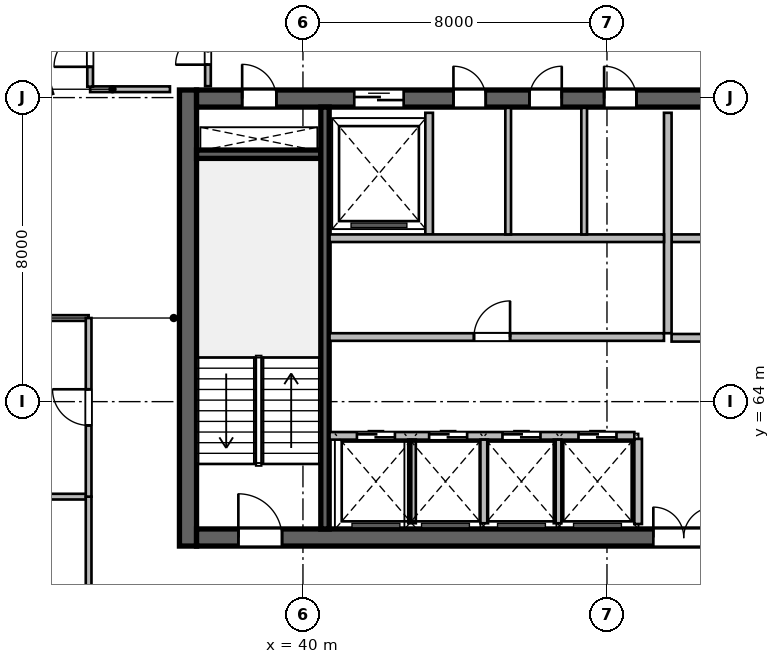
"""IFC4 building model, lengths in metres.
Left out: names, types, materials, properties, quantities, classifications, styles, units other than length and angle.
Written with IfcOpenShell. Run it as: python <this file> out.ifc"""

import sys

from ifc_helpers import new_model, si_unit, direction, frame, frame_2d, origin, place, context, subcontext, project, spatial, rectangle, extrude, source, transform, mapped, element, fill, save


model = new_model("IFC4")
c1 = context("Model", 3, precision=1e-05, world=origin(), true_north=direction((0.0, 1.0)))
c2 = subcontext(c1, "Body", "Model", "MODEL_VIEW")
j1 = project(units=[si_unit("LENGTHUNIT", "METRE"), si_unit("PLANEANGLEUNIT", "RADIAN")], contexts=[c1])
p1 = place(None, origin())
s1 = spatial("IfcSite", under=j1, at=p1, CompositionType="ELEMENT")
p2 = place(p1, origin())
s2 = spatial("IfcBuilding", under=s1, at=p2, CompositionType="ELEMENT")
p3 = place(p2, frame((0.0, 0.0, 211.8)))
s3 = spatial("IfcBuildingStorey", under=s2, at=p3, CompositionType="ELEMENT", Elevation=211.8)
m1 = source(origin(), c2, "Body", "SweptSolid", [
    extrude(rectangle(XDim=12.0, YDim=0.45, at=frame_2d((6.0, 0.0))), origin(), (0.0, 0.0, 1.0), 3.9),
])
p4 = place(p3, frame((36.975, 60.2, 0.0), z_axis=(0.0, 0.0, 1.0), x_axis=(0.0, 1.0, 0.0)))
e1 = element("IfcWall", 1, at=p4, inside=s3, PredefinedType="SHEAR", context=c2, shape_type="MappedRepresentation", body=[
    mapped(m1, transform((0.0, 0.0, 0.0), scale=1.0)),
])
m2 = source(origin(), c2, "Body", "SweptSolid", [
    extrude(rectangle(XDim=21.6, YDim=0.45, at=frame_2d((10.8, 0.0))), origin(), (0.0, 0.0, 1.0), 3.9),
])
p5 = place(p3, frame((37.2, 60.425, 0.0), z_axis=(0.0, 0.0, 1.0), x_axis=(1.0, 0.0, 0.0)))
e2 = element("IfcWall", 2, at=p5, inside=s3, PredefinedType="SHEAR", context=c2, shape_type="MappedRepresentation", body=[
    mapped(m2, transform((0.0, 0.0, 0.0), scale=1.0)),
])
p6 = place(p5, frame((1.1, 0.0, 0.0)))
e3 = element("IfcOpeningElement", 3, at=p6, cuts=e2, PredefinedType="OPENING", context=c2, shape_type="SweptSolid", body=[
    extrude(rectangle(XDim=1.15, YDim=2.15, at=frame_2d((0.575, 1.075))), frame((0.0, 0.235, 0.0), z_axis=(0.0, -1.0, 0.0), x_axis=(1.0, 0.0, 0.0)), (0.0, 0.0, 1.0), 0.47),
])
p7 = place(p5, frame((19.5, 0.0, 0.0)))
e4 = element("IfcOpeningElement", 4, at=p7, cuts=e2, PredefinedType="OPENING", context=c2, shape_type="SweptSolid", body=[
    extrude(rectangle(XDim=0.9, YDim=2.1, at=frame_2d((0.45, 1.05))), frame((0.0, 0.235, 0.0), z_axis=(0.0, -1.0, 0.0), x_axis=(1.0, 0.0, 0.0)), (0.0, 0.0, 1.0), 0.47),
])
p8 = place(p5, frame((12.02, 0.0, 0.0)))
e5 = element("IfcOpeningElement", 5, at=p8, cuts=e2, PredefinedType="OPENING", context=c2, shape_type="SweptSolid", body=[
    extrude(rectangle(XDim=1.6, YDim=2.15, at=frame_2d((0.8, 1.075))), frame((0.0, 0.235, 0.0), z_axis=(0.0, -1.0, 0.0), x_axis=(1.0, 0.0, 0.0)), (0.0, 0.0, 1.0), 0.47),
])
p9 = place(p3, frame((37.2, 71.975, 0.0), z_axis=(0.0, 0.0, 1.0), x_axis=(1.0, 0.0, 0.0)))
e6 = element("IfcWall", 6, at=p9, inside=s3, PredefinedType="SHEAR", context=c2, shape_type="MappedRepresentation", body=[
    mapped(m2, transform((0.0, 0.0, 0.0), scale=1.0)),
])
p10 = place(p9, frame((1.2, 0.0, 0.0)))
e7 = element("IfcOpeningElement", 7, at=p10, cuts=e6, PredefinedType="OPENING", context=c2, shape_type="SweptSolid", body=[
    extrude(rectangle(XDim=0.9, YDim=2.1, at=frame_2d((0.45, 1.05))), frame((0.0, 0.235, 0.0), z_axis=(0.0, -1.0, 0.0), x_axis=(1.0, 0.0, 0.0)), (0.0, 0.0, 1.0), 0.47),
])
p11 = place(p9, frame((14.7, 0.0, 0.0)))
e8 = element("IfcOpeningElement", 8, at=p11, cuts=e6, PredefinedType="OPENING", context=c2, shape_type="SweptSolid", body=[
    extrude(rectangle(XDim=1.2, YDim=2.15, at=frame_2d((0.6, 1.075))), frame((0.0, 0.235, 0.0), z_axis=(0.0, -1.0, 0.0), x_axis=(1.0, 0.0, 0.0)), (0.0, 0.0, 1.0), 0.47),
])
p12 = place(p9, frame((4.15, 0.0, 0.0)))
e9 = element("IfcOpeningElement", 9, at=p12, cuts=e6, PredefinedType="OPENING", context=c2, shape_type="SweptSolid", body=[
    extrude(rectangle(XDim=1.3, YDim=2.15, at=frame_2d((0.65, 1.075))), frame((0.0, 0.235, 0.0), z_axis=(0.0, -1.0, 0.0), x_axis=(1.0, 0.0, 0.0)), (0.0, 0.0, 1.0), 0.47),
])
p13 = place(p9, frame((6.76, 0.0, 0.0)))
e10 = element("IfcOpeningElement", 10, at=p13, cuts=e6, PredefinedType="OPENING", context=c2, shape_type="SweptSolid", body=[
    extrude(rectangle(XDim=0.85, YDim=2.1, at=frame_2d((0.425, 1.05))), frame((0.0, 0.235, 0.0), z_axis=(0.0, -1.0, 0.0), x_axis=(1.0, 0.0, 0.0)), (0.0, 0.0, 1.0), 0.47),
])
p14 = place(p9, frame((8.76, 0.0, 0.0)))
e11 = element("IfcOpeningElement", 11, at=p14, cuts=e6, PredefinedType="OPENING", context=c2, shape_type="SweptSolid", body=[
    extrude(rectangle(XDim=0.85, YDim=2.1, at=frame_2d((0.425, 1.05))), frame((0.0, 0.235, 0.0), z_axis=(0.0, -1.0, 0.0), x_axis=(1.0, 0.0, 0.0)), (0.0, 0.0, 1.0), 0.47),
])
p15 = place(p9, frame((10.725, 0.0, 0.0)))
e12 = element("IfcOpeningElement", 12, at=p15, cuts=e6, PredefinedType="OPENING", context=c2, shape_type="SweptSolid", body=[
    extrude(rectangle(XDim=0.85, YDim=2.1, at=frame_2d((0.425, 1.05))), frame((0.0, 0.235, 0.0), z_axis=(0.0, -1.0, 0.0), x_axis=(1.0, 0.0, 0.0)), (0.0, 0.0, 1.0), 0.47),
])
m3 = source(origin(), c2, "Body", "SweptSolid", [
    extrude(rectangle(XDim=3.27, YDim=0.22, at=frame_2d((1.635, 0.0))), origin(), (0.0, 0.0, 1.0), 3.9),
])
p16 = place(p3, frame((37.2, 70.51, 0.0), z_axis=(0.0, 0.0, 1.0), x_axis=(1.0, 0.0, 0.0)))
e13 = element("IfcWall", 13, at=p16, inside=s3, PredefinedType="SHEAR", context=c2, shape_type="MappedRepresentation", body=[
    mapped(m3, transform((0.0, 0.0, 0.0), scale=1.0)),
])
m4 = source(origin(), c2, "Body", "SweptSolid", [
    extrude(rectangle(XDim=11.1, YDim=0.22, at=frame_2d((5.55, 0.0))), origin(), (0.0, 0.0, 1.0), 3.9),
])
p17 = place(p3, frame((40.58, 60.65, 0.0), z_axis=(0.0, 0.0, 1.0), x_axis=(0.0, 1.0, 0.0)))
e14 = element("IfcWall", 14, at=p17, inside=s3, PredefinedType="SHEAR", context=c2, shape_type="MappedRepresentation", body=[
    mapped(m4, transform((0.0, 0.0, 0.0), scale=1.0)),
])
m5 = source(origin(), c2, "Body", "SweptSolid", [
    extrude(rectangle(XDim=2.24, YDim=0.2, at=frame_2d((1.12, 0.0))), origin(), (0.0, 0.0, 1.0), 3.64),
])
p18 = place(p3, frame((48.82, 60.78, 0.0), z_axis=(0.0, 0.0, 1.0), x_axis=(0.0, 1.0, 0.0)))
e15 = element("IfcWall", 15, at=p18, inside=s3, PredefinedType="SOLIDWALL", context=c2, shape_type="MappedRepresentation", body=[
    mapped(m5, transform((0.0, 0.0, 0.0), scale=1.0)),
])
m6 = source(origin(), c2, "Body", "SweptSolid", [
    extrude(rectangle(XDim=5.62, YDim=0.2, at=frame_2d((2.81, 0.0))), origin(), (0.0, 0.0, 1.0), 3.64),
])
p19 = place(p3, frame((49.7, 68.3, 0.0), z_axis=(0.0, 0.0, 1.0), x_axis=(1.0, 0.0, 0.0)))
e16 = element("IfcWall", 16, at=p19, inside=s3, PredefinedType="SOLIDWALL", context=c2, shape_type="MappedRepresentation", body=[
    mapped(m6, transform((0.0, 0.0, 0.0), scale=1.0)),
])
p20 = place(p19, frame((1.6, 0.0, 0.0)))
e17 = element("IfcOpeningElement", 17, at=p20, cuts=e16, PredefinedType="OPENING", context=c2, shape_type="SweptSolid", body=[
    extrude(rectangle(XDim=1.1, YDim=2.15, at=frame_2d((0.55, 1.075))), frame((0.0, 0.11, 0.0), z_axis=(0.0, -1.0, 0.0), x_axis=(1.0, 0.0, 0.0)), (0.0, 0.0, 1.0), 0.22),
])
p21 = place(p19, frame((3.7, 0.0, 0.0)))
e18 = element("IfcOpeningElement", 18, at=p21, cuts=e16, PredefinedType="OPENING", context=c2, shape_type="SweptSolid", body=[
    extrude(rectangle(XDim=1.1, YDim=2.15, at=frame_2d((0.55, 1.075))), frame((0.0, 0.11, 0.0), z_axis=(0.0, -1.0, 0.0), x_axis=(1.0, 0.0, 0.0)), (0.0, 0.0, 1.0), 0.22),
])
m7 = source(origin(), c2, "Body", "SweptSolid", [
    extrude(rectangle(XDim=5.8, YDim=0.2, at=frame_2d((2.9, 0.0))), origin(), (0.0, 0.0, 1.0), 3.64),
])
p22 = place(p3, frame((49.6, 65.8, 0.0), z_axis=(0.0, 0.0, 1.0), x_axis=(0.0, 1.0, 0.0)))
e19 = element("IfcWall", 19, at=p22, inside=s3, PredefinedType="SOLIDWALL", context=c2, shape_type="MappedRepresentation", body=[
    mapped(m7, transform((0.0, 0.0, 0.0), scale=1.0)),
])
p23 = place(p3, frame((49.7, 65.68, 0.0), z_axis=(0.0, 0.0, 1.0), x_axis=(1.0, 0.0, 0.0)))
e20 = element("IfcWall", 20, at=p23, inside=s3, PredefinedType="SOLIDWALL", context=c2, shape_type="MappedRepresentation", body=[
    mapped(m6, transform((0.0, 0.0, 0.0), scale=1.0)),
])
m8 = source(origin(), c2, "Body", "SweptSolid", [
    extrude(rectangle(XDim=3.2, YDim=0.2, at=frame_2d((1.6, 0.0))), origin(), (0.0, 0.0, 1.0), 3.64),
])
p24 = place(p3, frame((43.32, 68.4, 0.0), z_axis=(0.0, 0.0, 1.0), x_axis=(0.0, 1.0, 0.0)))
e21 = element("IfcWall", 21, at=p24, inside=s3, PredefinedType="SOLIDWALL", context=c2, shape_type="MappedRepresentation", body=[
    mapped(m8, transform((0.0, 0.0, 0.0), scale=1.0)),
])
m9 = source(origin(), c2, "Body", "SweptSolid", [
    extrude(rectangle(XDim=8.8, YDim=0.2, at=frame_2d((4.4, 0.0))), origin(), (0.0, 0.0, 1.0), 3.64),
])
p25 = place(p3, frame((40.7, 68.3, 0.0), z_axis=(0.0, 0.0, 1.0), x_axis=(1.0, 0.0, 0.0)))
e22 = element("IfcWall", 22, at=p25, inside=s3, PredefinedType="SOLIDWALL", context=c2, shape_type="MappedRepresentation", body=[
    mapped(m9, transform((0.0, 0.0, 0.0), scale=1.0)),
])
m10 = source(origin(), c2, "Body", "SweptSolid", [
    extrude(rectangle(XDim=3.33, YDim=0.15, at=frame_2d((1.665, 0.0))), origin(), (0.0, 0.0, 1.0), 3.64),
])
for number, where, z_axis, x_axis in (
    (23, (45.4, 68.4, 0.0), (0.0, 0.0, 1.0), (0.0, 1.0, 0.0)),
    (24, (47.4, 68.4, 0.0), (0.0, 0.0, 1.0), (0.0, 1.0, 0.0)),
):
    element("IfcWall", number, at=place(p3, frame(where, z_axis=z_axis, x_axis=x_axis)), inside=s3, PredefinedType="PARTITIONING", context=c2, shape_type="MappedRepresentation", body=[
        mapped(m10, transform((0.0, 0.0, 0.0), scale=1.0)),
    ])
m11 = source(origin(), c2, "Body", "SweptSolid", [
    extrude(rectangle(XDim=8.02, YDim=0.2, at=frame_2d((4.01, 0.0))), origin(), (0.0, 0.0, 1.0), 3.64),
])
p26 = place(p3, frame((40.7, 63.1, 0.0), z_axis=(0.0, 0.0, 1.0), x_axis=(1.0, 0.0, 0.0)))
e25 = element("IfcWall", 25, at=p26, inside=s3, PredefinedType="SOLIDWALL", context=c2, shape_type="MappedRepresentation", body=[
    mapped(m11, transform((0.0, 0.0, 0.0), scale=1.0)),
])
p27 = place(p26, frame((0.72, 0.0, 0.0)))
e26 = element("IfcOpeningElement", 26, at=p27, cuts=e25, PredefinedType="OPENING", context=c2, shape_type="SweptSolid", body=[
    extrude(rectangle(XDim=1.0, YDim=2.15, at=frame_2d((0.5, 1.075))), frame((0.0, 0.11, 0.0), z_axis=(0.0, -1.0, 0.0), x_axis=(1.0, 0.0, 0.0)), (0.0, 0.0, 1.0), 0.22),
])
p28 = place(p26, frame((2.62, 0.0, 0.0)))
e27 = element("IfcOpeningElement", 27, at=p28, cuts=e25, PredefinedType="OPENING", context=c2, shape_type="SweptSolid", body=[
    extrude(rectangle(XDim=1.0, YDim=2.15, at=frame_2d((0.5, 1.075))), frame((0.0, 0.11, 0.0), z_axis=(0.0, -1.0, 0.0), x_axis=(1.0, 0.0, 0.0)), (0.0, 0.0, 1.0), 0.22),
])
p29 = place(p26, frame((4.55, 0.0, 0.0)))
e28 = element("IfcOpeningElement", 28, at=p29, cuts=e25, PredefinedType="OPENING", context=c2, shape_type="SweptSolid", body=[
    extrude(rectangle(XDim=1.0, YDim=2.15, at=frame_2d((0.5, 1.075))), frame((0.0, 0.11, 0.0), z_axis=(0.0, -1.0, 0.0), x_axis=(1.0, 0.0, 0.0)), (0.0, 0.0, 1.0), 0.22),
])
p30 = place(p26, frame((6.55, 0.0, 0.0)))
e29 = element("IfcOpeningElement", 29, at=p30, cuts=e25, PredefinedType="OPENING", context=c2, shape_type="SweptSolid", body=[
    extrude(rectangle(XDim=1.0, YDim=2.15, at=frame_2d((0.5, 1.075))), frame((0.0, 0.11, 0.0), z_axis=(0.0, -1.0, 0.0), x_axis=(1.0, 0.0, 0.0)), (0.0, 0.0, 1.0), 0.22),
])
m12 = source(origin(), c2, "Body", "SweptSolid", [
    extrude(rectangle(XDim=2.2, YDim=0.2, at=frame_2d((1.1, 0.0))), origin(), (0.0, 0.0, 1.0), 3.64),
])
for number, where, z_axis, x_axis in (
    (30, (42.87, 60.8, 0.0), (0.0, 0.0, 1.0), (0.0, 1.0, 0.0)),
    (31, (44.77, 60.8, 0.0), (0.0, 0.0, 1.0), (0.0, 1.0, 0.0)),
    (32, (46.7, 60.8, 0.0), (0.0, 0.0, 1.0), (0.0, 1.0, 0.0)),
):
    element("IfcWall", number, at=place(p3, frame(where, z_axis=z_axis, x_axis=x_axis)), inside=s3, PredefinedType="SOLIDWALL", context=c2, shape_type="MappedRepresentation", body=[
        mapped(m12, transform((0.0, 0.0, 0.0), scale=1.0)),
    ])
p31 = place(p3, frame((40.7, 65.7, 0.0), z_axis=(0.0, 0.0, 1.0), x_axis=(1.0, 0.0, 0.0)))
e33 = element("IfcWall", 33, at=p31, inside=s3, PredefinedType="SOLIDWALL", context=c2, shape_type="MappedRepresentation", body=[
    mapped(m9, transform((0.0, 0.0, 0.0), scale=1.0)),
])
p32 = place(p31, frame((3.8, 0.0, 0.0)))
e34 = element("IfcOpeningElement", 34, at=p32, cuts=e33, PredefinedType="OPENING", context=c2, shape_type="SweptSolid", body=[
    extrude(rectangle(XDim=0.95, YDim=2.15, at=frame_2d((0.475, 1.075))), frame((0.0, 0.11, 0.0), z_axis=(0.0, -1.0, 0.0), x_axis=(1.0, 0.0, 0.0)), (0.0, 0.0, 1.0), 0.22),
])
m13 = source(origin(), c2, "Body", "SweptSolid", [
    extrude(rectangle(XDim=2.1, YDim=0.15, at=frame_2d((1.05, 0.0))), origin(), (0.0, 0.0, 1.0), 3.64),
])
p33 = place(p3, frame((34.4, 72.22, 0.0), z_axis=(0.0, 0.0, 1.0), x_axis=(1.0, 0.0, 0.0)))
e35 = element("IfcWall", 35, at=p33, inside=s3, PredefinedType="PARTITIONING", context=c2, shape_type="MappedRepresentation", body=[
    mapped(m13, transform((0.0, 0.0, 0.0), scale=1.0)),
])
m14 = source(origin(), c2, "Body", "SweptSolid", [
    extrude(rectangle(XDim=1.995, YDim=0.15, at=frame_2d((0.998, 0.0))), origin(), (0.0, 0.0, 1.0), 3.64),
])
p34 = place(p3, frame((34.4, 72.288, 0.0), z_axis=(0.0, 0.0, 1.0), x_axis=(0.0, 1.0, 0.0)))
e36 = element("IfcWall", 36, at=p34, inside=s3, PredefinedType="PARTITIONING", context=c2, shape_type="MappedRepresentation", body=[
    mapped(m14, transform((0.0, 0.0, 0.0), scale=1.0)),
])
p35 = place(p34, frame((0.522, 0.0, 0.0)))
e37 = element("IfcOpeningElement", 37, at=p35, cuts=e36, PredefinedType="OPENING", context=c2, shape_type="SweptSolid", body=[
    extrude(rectangle(XDim=0.95, YDim=2.1, at=frame_2d((0.475, 1.05))), frame((0.0, 0.085, 0.0), z_axis=(0.0, -1.0, 0.0), x_axis=(1.0, 0.0, 0.0)), (0.0, 0.0, 1.0), 0.17),
])
m15 = source(origin(), c2, "Body", "SweptSolid", [
    extrude(rectangle(XDim=1.982, YDim=0.15, at=frame_2d((0.991, 0.0))), origin(), (0.0, 0.0, 1.0), 3.64),
])
p36 = place(p3, frame((37.5, 72.3, 0.0), z_axis=(0.0, 0.0, 1.0), x_axis=(0.0, 1.0, 0.0)))
e38 = element("IfcWall", 38, at=p36, inside=s3, PredefinedType="PARTITIONING", context=c2, shape_type="MappedRepresentation", body=[
    mapped(m15, transform((0.0, 0.0, 0.0), scale=1.0)),
])
p37 = place(p36, frame((0.566, 0.0, 0.0)))
e39 = element("IfcOpeningElement", 39, at=p37, cuts=e38, PredefinedType="OPENING", context=c2, shape_type="SweptSolid", body=[
    extrude(rectangle(XDim=0.85, YDim=2.1, at=frame_2d((0.425, 1.05))), frame((0.0, 0.085, 0.0), z_axis=(0.0, -1.0, 0.0), x_axis=(1.0, 0.0, 0.0)), (0.0, 0.0, 1.0), 0.17),
])
m16 = source(origin(), c2, "Body", "SweptSolid", [
    extrude(rectangle(XDim=18.15, YDim=0.15, at=frame_2d((9.075, 0.0))), origin(), (0.0, 0.0, 1.0), 3.64),
])
p38 = place(p3, frame((16.21, 61.5, 0.0), z_axis=(0.0, 0.0, 1.0), x_axis=(1.0, 0.0, 0.0)))
e40 = element("IfcWall", 40, at=p38, inside=s3, PredefinedType="PARTITIONING", context=c2, shape_type="MappedRepresentation", body=[
    mapped(m16, transform((0.0, 0.0, 0.0), scale=1.0)),
])
m17 = source(origin(), c2, "Body", "SweptSolid", [
    extrude(rectangle(XDim=3.54, YDim=0.15, at=frame_2d((1.77, 0.0))), origin(), (0.0, 0.0, 1.0), 3.64),
])
p39 = place(p3, frame((34.36, 57.96, 0.0), z_axis=(0.0, 0.0, 1.0), x_axis=(0.0, 1.0, 0.0)))
e41 = element("IfcWall", 41, at=p39, inside=s3, PredefinedType="PARTITIONING", context=c2, shape_type="MappedRepresentation", body=[
    mapped(m17, transform((0.0, 0.0, 0.0), scale=1.0)),
])
m18 = source(origin(), c2, "Body", "SweptSolid", [
    extrude(rectangle(XDim=14.542, YDim=0.15, at=frame_2d((7.271, 0.0))), origin(), (0.0, 0.0, 1.0), 3.64),
])
p40 = place(p3, frame((19.818, 66.2, 0.0), z_axis=(0.0, 0.0, 1.0), x_axis=(1.0, 0.0, 0.0)))
e42 = element("IfcWall", 42, at=p40, inside=s3, PredefinedType="PARTITIONING", context=c2, shape_type="MappedRepresentation", body=[
    mapped(m18, transform((0.0, 0.0, 0.0), scale=1.0)),
])
m19 = source(origin(), c2, "Body", "SweptSolid", [
    extrude(rectangle(XDim=4.7, YDim=0.15, at=frame_2d((2.35, 0.0))), origin(), (0.0, 0.0, 1.0), 3.64),
])
p41 = place(p3, frame((34.36, 61.5, 0.0), z_axis=(0.0, 0.0, 1.0), x_axis=(0.0, 1.0, 0.0)))
e43 = element("IfcWall", 43, at=p41, inside=s3, PredefinedType="PARTITIONING", context=c2, shape_type="MappedRepresentation", body=[
    mapped(m19, transform((0.0, 0.0, 0.0), scale=1.0)),
])
p42 = place(p41, frame((1.875, 0.0, 0.0)))
e44 = element("IfcOpeningElement", 44, at=p42, cuts=e43, PredefinedType="OPENING", context=c2, shape_type="SweptSolid", body=[
    extrude(rectangle(XDim=0.95, YDim=2.1, at=frame_2d((0.475, 1.05))), frame((0.0, 0.085, 0.0), z_axis=(0.0, -1.0, 0.0), x_axis=(1.0, 0.0, 0.0)), (0.0, 0.0, 1.0), 0.17),
])
m20 = source(origin(), c2, "Body", "SweptSolid", [
    extrude(rectangle(XDim=1.15, YDim=2.15, at=frame_2d((0.575, 1.075))), frame((0.0, 0.025, 0.0), z_axis=(0.0, -1.0, 0.0), x_axis=(1.0, 0.0, 0.0)), (0.0, 0.0, 1.0), 0.05),
])
p43 = place(p6, origin())
e45 = element("IfcDoor", 45, at=p43, inside=s3, OperationType="SINGLE_SWING_LEFT", PredefinedType="DOOR", context=c2, shape_type="MappedRepresentation", body=[
    mapped(m20, transform((0.0, 0.0, 0.0), scale=1.0)),
])
fill(e3, e45)
m21 = source(origin(), c2, "Body", "SweptSolid", [
    extrude(rectangle(XDim=0.9, YDim=2.1, at=frame_2d((0.45, 1.05))), frame((0.0, 0.025, 0.0), z_axis=(0.0, -1.0, 0.0), x_axis=(1.0, 0.0, 0.0)), (0.0, 0.0, 1.0), 0.05),
])
p44 = place(p10, origin())
e46 = element("IfcDoor", 46, at=p44, inside=s3, OperationType="SINGLE_SWING_LEFT", PredefinedType="DOOR", context=c2, shape_type="MappedRepresentation", body=[
    mapped(m21, transform((0.0, 0.0, 0.0), scale=1.0)),
])
fill(e7, e46)
m22 = source(origin(), c2, "Body", "SweptSolid", [
    extrude(rectangle(XDim=1.6, YDim=2.15, at=frame_2d((0.8, 1.075))), frame((0.0, 0.025, 0.0), z_axis=(0.0, -1.0, 0.0), x_axis=(1.0, 0.0, 0.0)), (0.0, 0.0, 1.0), 0.05),
])
p45 = place(p8, origin())
e47 = element("IfcDoor", 47, at=p45, inside=s3, OperationType="DOUBLE_DOOR_SINGLE_SWING", PredefinedType="DOOR", context=c2, shape_type="MappedRepresentation", body=[
    mapped(m22, transform((0.0, 0.0, 0.0), scale=1.0)),
])
fill(e5, e47)
m23 = source(origin(), c2, "Body", "SweptSolid", [
    extrude(rectangle(XDim=1.3, YDim=2.15, at=frame_2d((0.65, 1.075))), frame((0.0, 0.025, 0.0), z_axis=(0.0, -1.0, 0.0), x_axis=(1.0, 0.0, 0.0)), (0.0, 0.0, 1.0), 0.05),
])
p46 = place(p12, origin())
e48 = element("IfcDoor", 48, at=p46, inside=s3, OperationType="DOUBLE_DOOR_SLIDING", PredefinedType="DOOR", context=c2, shape_type="MappedRepresentation", body=[
    mapped(m23, transform((0.0, 0.0, 0.0), scale=1.0)),
])
fill(e9, e48)
m24 = source(origin(), c2, "Body", "SweptSolid", [
    extrude(rectangle(XDim=0.85, YDim=2.1, at=frame_2d((0.425, 1.05))), frame((0.0, 0.025, 0.0), z_axis=(0.0, -1.0, 0.0), x_axis=(1.0, 0.0, 0.0)), (0.0, 0.0, 1.0), 0.05),
])
p47 = place(p13, origin())
e49 = element("IfcDoor", 49, at=p47, inside=s3, OperationType="SINGLE_SWING_LEFT", PredefinedType="DOOR", context=c2, shape_type="MappedRepresentation", body=[
    mapped(m24, transform((0.0, 0.0, 0.0), scale=1.0)),
])
fill(e10, e49)
p48 = place(p14, origin())
e50 = element("IfcDoor", 50, at=p48, inside=s3, OperationType="SINGLE_SWING_RIGHT", PredefinedType="DOOR", context=c2, shape_type="MappedRepresentation", body=[
    mapped(m24, transform((0.0, 0.0, 0.0), scale=1.0)),
])
fill(e11, e50)
p49 = place(p15, origin())
e51 = element("IfcDoor", 51, at=p49, inside=s3, OperationType="SINGLE_SWING_LEFT", PredefinedType="DOOR", context=c2, shape_type="MappedRepresentation", body=[
    mapped(m24, transform((0.0, 0.0, 0.0), scale=1.0)),
])
fill(e12, e51)
m25 = source(origin(), c2, "Body", "SweptSolid", [
    extrude(rectangle(XDim=1.0, YDim=2.15, at=frame_2d((0.5, 1.075))), frame((0.0, 0.025, 0.0), z_axis=(0.0, -1.0, 0.0), x_axis=(1.0, 0.0, 0.0)), (0.0, 0.0, 1.0), 0.05),
])
p50 = place(p27, origin())
e52 = element("IfcDoor", 52, at=p50, inside=s3, OperationType="DOUBLE_DOOR_SLIDING", PredefinedType="DOOR", context=c2, shape_type="MappedRepresentation", body=[
    mapped(m25, transform((0.0, 0.0, 0.0), scale=1.0)),
])
fill(e26, e52)
p51 = place(p28, origin())
e53 = element("IfcDoor", 53, at=p51, inside=s3, OperationType="DOUBLE_DOOR_SLIDING", PredefinedType="DOOR", context=c2, shape_type="MappedRepresentation", body=[
    mapped(m25, transform((0.0, 0.0, 0.0), scale=1.0)),
])
fill(e27, e53)
p52 = place(p29, origin())
e54 = element("IfcDoor", 54, at=p52, inside=s3, OperationType="DOUBLE_DOOR_SLIDING", PredefinedType="DOOR", context=c2, shape_type="MappedRepresentation", body=[
    mapped(m25, transform((0.0, 0.0, 0.0), scale=1.0)),
])
fill(e28, e54)
p53 = place(p30, origin())
e55 = element("IfcDoor", 55, at=p53, inside=s3, OperationType="DOUBLE_DOOR_SLIDING", PredefinedType="DOOR", context=c2, shape_type="MappedRepresentation", body=[
    mapped(m25, transform((0.0, 0.0, 0.0), scale=1.0)),
])
fill(e29, e55)
m26 = source(origin(), c2, "Body", "SweptSolid", [
    extrude(rectangle(XDim=0.95, YDim=2.15, at=frame_2d((0.475, 1.075))), frame((0.0, 0.025, 0.0), z_axis=(0.0, -1.0, 0.0), x_axis=(1.0, 0.0, 0.0)), (0.0, 0.0, 1.0), 0.05),
])
p54 = place(p32, origin())
e56 = element("IfcDoor", 56, at=p54, inside=s3, OperationType="SINGLE_SWING_RIGHT", PredefinedType="DOOR", context=c2, shape_type="MappedRepresentation", body=[
    mapped(m26, transform((0.0, 0.0, 0.0), scale=1.0)),
])
fill(e34, e56)
p55 = place(p37, origin())
e57 = element("IfcDoor", 57, at=p55, inside=s3, OperationType="SINGLE_SWING_LEFT", PredefinedType="DOOR", context=c2, shape_type="MappedRepresentation", body=[
    mapped(m24, transform((0.0, 0.0, 0.0), scale=1.0)),
])
fill(e39, e57)
m27 = source(origin(), c2, "Body", "SweptSolid", [
    extrude(rectangle(XDim=0.95, YDim=2.1, at=frame_2d((0.475, 1.05))), frame((0.0, 0.025, 0.0), z_axis=(0.0, -1.0, 0.0), x_axis=(1.0, 0.0, 0.0)), (0.0, 0.0, 1.0), 0.05),
])
p56 = place(p42, origin())
e58 = element("IfcDoor", 58, at=p56, inside=s3, OperationType="SINGLE_SWING_RIGHT", PredefinedType="DOOR", context=c2, shape_type="MappedRepresentation", body=[
    mapped(m27, transform((0.0, 0.0, 0.0), scale=1.0)),
])
fill(e44, e58)
p57 = place(p35, origin())
e59 = element("IfcDoor", 59, at=p57, inside=s3, OperationType="SINGLE_SWING_LEFT", PredefinedType="DOOR", context=c2, shape_type="MappedRepresentation", body=[
    mapped(m27, transform((0.0, 0.0, 0.0), scale=1.0)),
])
fill(e37, e59)
save(model, sys.argv[1])
